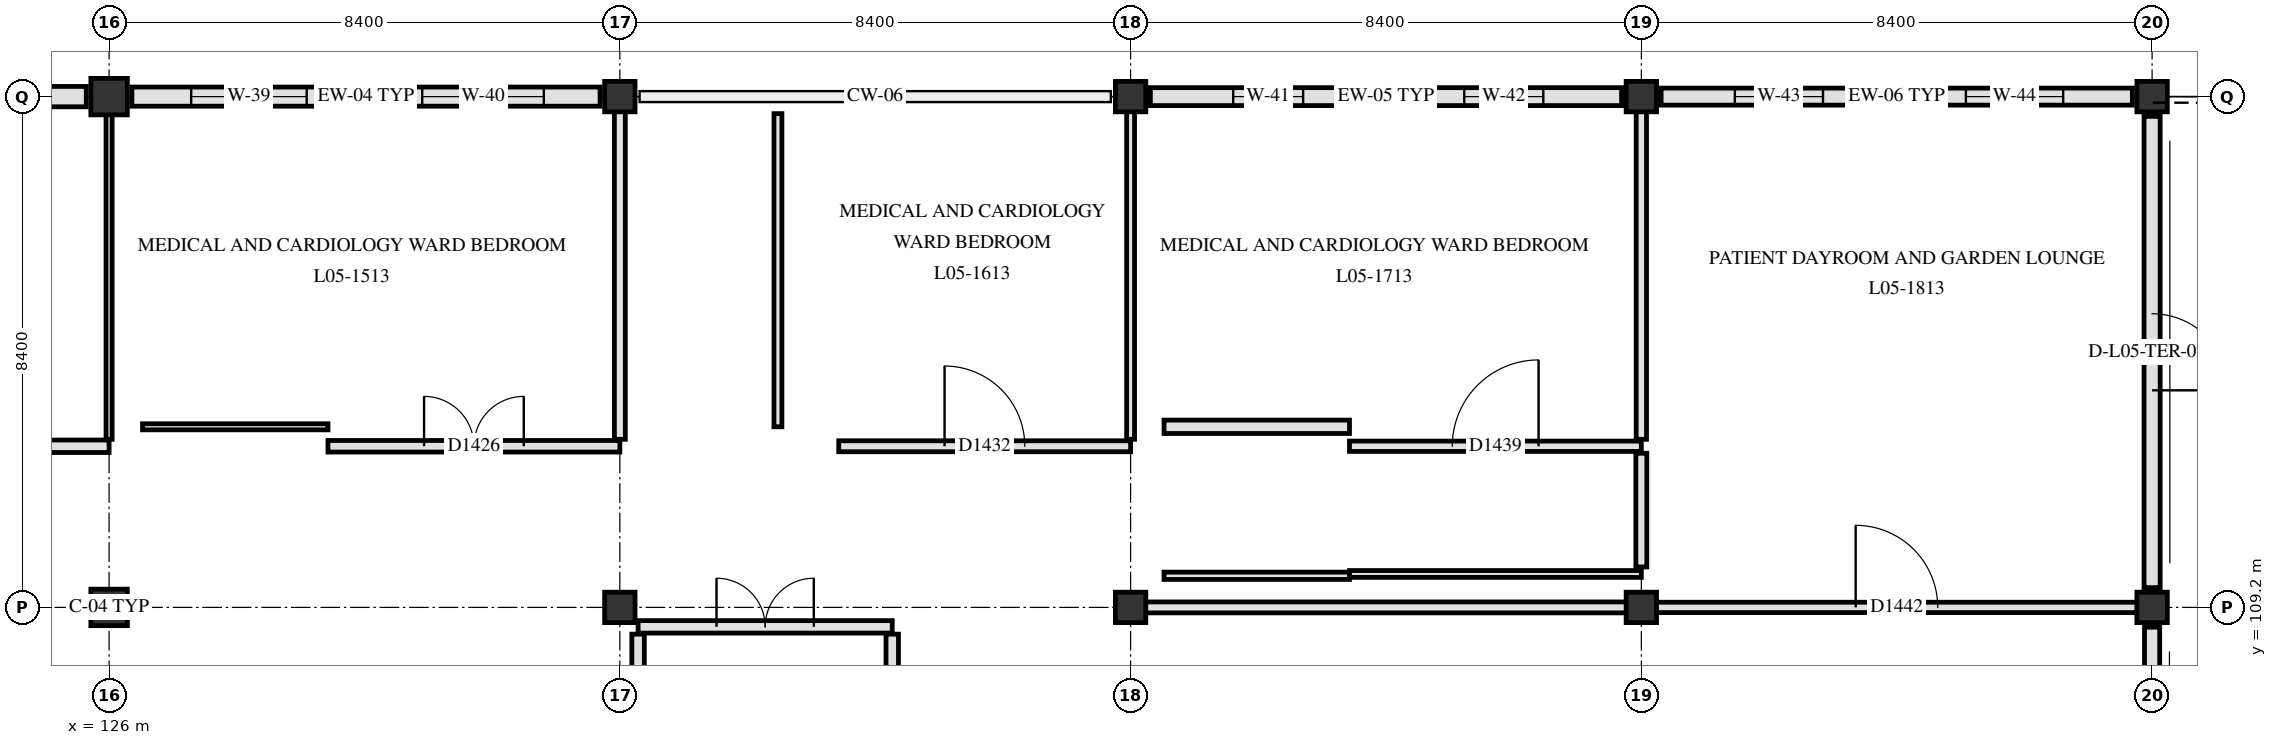
"""IFC4 building model, lengths in metres.
Left out: names, types, materials, properties, quantities, classifications, styles, units other than length and angle.
Written with IfcOpenShell. Run it as: python <this file> out.ifc"""

import sys

from ifc_helpers import new_model, si_unit, direction, frame, frame_2d, origin, origin_2d, place, context, subcontext, project, spatial, rectangle, extrude, element, fill, save


model = new_model("IFC4")
c1 = context("Model", 3, precision=1e-05, world=origin(), true_north=direction((0.0, 1.0)))
c2 = subcontext(c1, "Body", "Model", "MODEL_VIEW")
j1 = project(units=[si_unit("LENGTHUNIT", "METRE"), si_unit("PLANEANGLEUNIT", "RADIAN")], contexts=[c1])
p1 = place(None, origin())
s1 = spatial("IfcSite", under=j1, at=p1, CompositionType="ELEMENT")
p2 = place(p1, origin())
s2 = spatial("IfcBuilding", under=s1, at=p2, CompositionType="ELEMENT")
p3 = place(p2, frame((0.0, 0.0, 22.5)))
s3 = spatial("IfcBuildingStorey", under=s2, at=p3, CompositionType="ELEMENT", Elevation=22.5)
for number, where, z_axis, x_axis in (
    (1, (126.0, 109.2, 0.0), (0.0, 0.0, 1.0), (1.0, 0.0, 0.0)),
    (2, (126.0, 117.6, 0.0), (0.0, 0.0, 1.0), (1.0, 0.0, 0.0)),
):
    element("IfcColumn", number, at=place(p3, frame(where, z_axis=z_axis, x_axis=x_axis)), inside=s3, PredefinedType="COLUMN", context=c2, shape_type="SweptSolid", body=[
        extrude(rectangle(XDim=0.6, YDim=0.6, at=origin_2d()), origin(), (0.0, 0.0, 1.0), 3.9),
    ])
for number, where, z_axis, x_axis in (
    (3, (134.4, 109.2, 0.0), (0.0, 0.0, 1.0), (1.0, 0.0, 0.0)),
    (4, (134.4, 117.6, 0.0), (0.0, 0.0, 1.0), (1.0, 0.0, 0.0)),
    (5, (142.8, 109.2, 0.0), (0.0, 0.0, 1.0), (1.0, 0.0, 0.0)),
    (6, (142.8, 117.6, 0.0), (0.0, 0.0, 1.0), (1.0, 0.0, 0.0)),
    (7, (151.2, 109.2, 0.0), (0.0, 0.0, 1.0), (1.0, 0.0, 0.0)),
    (8, (151.2, 117.6, 0.0), (0.0, 0.0, 1.0), (1.0, 0.0, 0.0)),
    (9, (159.6, 109.2, 0.0), (0.0, 0.0, 1.0), (1.0, 0.0, 0.0)),
    (10, (159.6, 117.6, 0.0), (0.0, 0.0, 1.0), (1.0, 0.0, 0.0)),
):
    element("IfcColumn", number, at=place(p3, frame(where, z_axis=z_axis, x_axis=x_axis)), inside=s3, PredefinedType="COLUMN", context=c2, shape_type="SweptSolid", body=[
        extrude(rectangle(XDim=0.5, YDim=0.5, at=origin_2d()), origin(), (0.0, 0.0, 1.0), 3.9),
    ])
p4 = place(p3, frame((117.975, 117.6, 0.0), z_axis=(0.0, 0.0, 1.0), x_axis=(1.0, 0.0, 0.0)))
e11 = element("IfcWall", 11, at=p4, inside=s3, PredefinedType="SOLIDWALL", context=c2, shape_type="SweptSolid", body=[
    extrude(rectangle(XDim=7.65, YDim=0.335, at=frame_2d((3.825, 0.0))), origin(), (0.0, 0.0, 1.0), 3.31),
])
p5 = place(p4, frame((1.062, 0.0, 0.85)))
e12 = element("IfcOpeningElement", 12, at=p5, cuts=e11, PredefinedType="OPENING", context=c2, shape_type="SweptSolid", body=[
    extrude(rectangle(XDim=1.7, YDim=1.66, at=frame_2d((0.85, 0.83))), frame((0.0, 0.177, 0.0), z_axis=(0.0, -1.0, 0.0), x_axis=(1.0, 0.0, 0.0)), (0.0, 0.0, 1.0), 0.355),
])
p6 = place(p4, frame((4.837, 0.0, 0.85)))
e13 = element("IfcOpeningElement", 13, at=p6, cuts=e11, PredefinedType="OPENING", context=c2, shape_type="SweptSolid", body=[
    extrude(rectangle(XDim=1.8, YDim=1.66, at=frame_2d((0.9, 0.83))), frame((0.0, 0.177, 0.0), z_axis=(0.0, -1.0, 0.0), x_axis=(1.0, 0.0, 0.0)), (0.0, 0.0, 1.0), 0.355),
])
p7 = place(p3, frame((126.375, 117.6, 0.0), z_axis=(0.0, 0.0, 1.0), x_axis=(1.0, 0.0, 0.0)))
e14 = element("IfcWall", 14, at=p7, inside=s3, PredefinedType="SOLIDWALL", context=c2, shape_type="SweptSolid", body=[
    extrude(rectangle(XDim=7.7, YDim=0.315, at=frame_2d((3.85, 0.0))), origin(), (0.0, 0.0, 1.0), 3.31),
])
p8 = place(p7, frame((0.975, 0.0, 0.85)))
e15 = element("IfcOpeningElement", 15, at=p8, cuts=e14, PredefinedType="OPENING", context=c2, shape_type="SweptSolid", body=[
    extrude(rectangle(XDim=1.9, YDim=1.66, at=frame_2d((0.95, 0.83))), frame((0.0, 0.167, 0.0), z_axis=(0.0, -1.0, 0.0), x_axis=(1.0, 0.0, 0.0)), (0.0, 0.0, 1.0), 0.335),
])
p9 = place(p7, frame((4.775, 0.0, 0.85)))
e16 = element("IfcOpeningElement", 16, at=p9, cuts=e14, PredefinedType="OPENING", context=c2, shape_type="SweptSolid", body=[
    extrude(rectangle(XDim=2.0, YDim=1.66, at=frame_2d((1.0, 0.83))), frame((0.0, 0.167, 0.0), z_axis=(0.0, -1.0, 0.0), x_axis=(1.0, 0.0, 0.0)), (0.0, 0.0, 1.0), 0.335),
])
p10 = place(p3, frame((143.125, 117.6, 0.0), z_axis=(0.0, 0.0, 1.0), x_axis=(1.0, 0.0, 0.0)))
e17 = element("IfcWall", 17, at=p10, inside=s3, PredefinedType="SOLIDWALL", context=c2, shape_type="SweptSolid", body=[
    extrude(rectangle(XDim=7.75, YDim=0.295, at=frame_2d((3.875, 0.0))), origin(), (0.0, 0.0, 1.0), 3.31),
])
p11 = place(p10, frame((1.363, 0.0, 0.85)))
e18 = element("IfcOpeningElement", 18, at=p11, cuts=e17, PredefinedType="OPENING", context=c2, shape_type="SweptSolid", body=[
    extrude(rectangle(XDim=1.15, YDim=1.78, at=frame_2d((0.575, 0.89))), frame((0.0, 0.157, 0.0), z_axis=(0.0, -1.0, 0.0), x_axis=(1.0, 0.0, 0.0)), (0.0, 0.0, 1.0), 0.315),
])
p12 = place(p10, frame((5.163, 0.0, 0.85)))
e19 = element("IfcOpeningElement", 19, at=p12, cuts=e17, PredefinedType="OPENING", context=c2, shape_type="SweptSolid", body=[
    extrude(rectangle(XDim=1.3, YDim=1.78, at=frame_2d((0.65, 0.89))), frame((0.0, 0.157, 0.0), z_axis=(0.0, -1.0, 0.0), x_axis=(1.0, 0.0, 0.0)), (0.0, 0.0, 1.0), 0.315),
])
p13 = place(p3, frame((151.525, 117.6, 0.0), z_axis=(0.0, 0.0, 1.0), x_axis=(1.0, 0.0, 0.0)))
e20 = element("IfcWall", 20, at=p13, inside=s3, PredefinedType="SOLIDWALL", context=c2, shape_type="SweptSolid", body=[
    extrude(rectangle(XDim=7.75, YDim=0.28, at=frame_2d((3.875, 0.0))), origin(), (0.0, 0.0, 1.0), 3.3),
])
p14 = place(p13, frame((1.212, 0.0, 0.85)))
e21 = element("IfcOpeningElement", 21, at=p14, cuts=e20, PredefinedType="OPENING", context=c2, shape_type="SweptSolid", body=[
    extrude(rectangle(XDim=1.45, YDim=1.78, at=frame_2d((0.725, 0.89))), frame((0.0, 0.15, 0.0), z_axis=(0.0, -1.0, 0.0), x_axis=(1.0, 0.0, 0.0)), (0.0, 0.0, 1.0), 0.3),
])
p15 = place(p13, frame((5.012, 0.0, 0.85)))
e22 = element("IfcOpeningElement", 22, at=p15, cuts=e20, PredefinedType="OPENING", context=c2, shape_type="SweptSolid", body=[
    extrude(rectangle(XDim=1.6, YDim=1.78, at=frame_2d((0.8, 0.89))), frame((0.0, 0.15, 0.0), z_axis=(0.0, -1.0, 0.0), x_axis=(1.0, 0.0, 0.0)), (0.0, 0.0, 1.0), 0.3),
])
p16 = place(p3, frame((159.6, 117.275, 0.0), z_axis=(0.0, 0.0, 1.0), x_axis=(0.0, -1.0, 0.0)))
e23 = element("IfcWall", 23, at=p16, inside=s3, PredefinedType="SOLIDWALL", context=c2, shape_type="SweptSolid", body=[
    extrude(rectangle(XDim=7.75, YDim=0.265, at=frame_2d((3.875, 0.0))), origin(), (0.0, 0.0, 1.0), 3.37),
])
p17 = place(p16, frame((3.245, 0.0, 0.0)))
e24 = element("IfcOpeningElement", 24, at=p17, cuts=e23, PredefinedType="OPENING", context=c2, shape_type="SweptSolid", body=[
    extrude(rectangle(XDim=1.26, YDim=2.15, at=frame_2d((0.63, 1.075))), frame((0.0, 0.142, 0.0), z_axis=(0.0, -1.0, 0.0), x_axis=(1.0, 0.0, 0.0)), (0.0, 0.0, 1.0), 0.285),
])
p18 = place(p3, frame((159.6, 108.875, 0.0), z_axis=(0.0, 0.0, 1.0), x_axis=(0.0, -1.0, 0.0)))
e25 = element("IfcWall", 25, at=p18, inside=s3, PredefinedType="SOLIDWALL", context=c2, shape_type="SweptSolid", body=[
    extrude(rectangle(XDim=7.75, YDim=0.25, at=frame_2d((3.875, 0.0))), origin(), (0.0, 0.0, 1.0), 3.37),
])
p19 = place(p18, frame((1.462, 0.0, 0.85)))
e26 = element("IfcOpeningElement", 26, at=p19, cuts=e25, PredefinedType="OPENING", context=c2, shape_type="SweptSolid", body=[
    extrude(rectangle(XDim=0.95, YDim=1.3, at=frame_2d((0.475, 0.65))), frame((0.0, 0.135, 0.0), z_axis=(0.0, -1.0, 0.0), x_axis=(1.0, 0.0, 0.0)), (0.0, 0.0, 1.0), 0.27),
])
p20 = place(p18, frame((5.288, 0.0, 0.85)))
e27 = element("IfcOpeningElement", 27, at=p20, cuts=e25, PredefinedType="OPENING", context=c2, shape_type="SweptSolid", body=[
    extrude(rectangle(XDim=1.05, YDim=1.3, at=frame_2d((0.525, 0.65))), frame((0.0, 0.135, 0.0), z_axis=(0.0, -1.0, 0.0), x_axis=(1.0, 0.0, 0.0)), (0.0, 0.0, 1.0), 0.27),
])
for number, where, z_axis, x_axis in (
    (28, (138.88, 104.64, 0.0), (0.0, 0.0, 1.0), (0.0, 1.0, 0.0)),
    (29, (134.7, 104.64, 0.0), (0.0, 0.0, 1.0), (0.0, 1.0, 0.0)),
):
    element("IfcWall", number, at=place(p3, frame(where, z_axis=z_axis, x_axis=x_axis)), inside=s3, PredefinedType="PARTITIONING", context=c2, shape_type="SweptSolid", body=[
        extrude(rectangle(XDim=4.12, YDim=0.205, at=frame_2d((2.06, 0.0))), origin(), (0.0, 0.0, 1.0), 3.61),
    ])
p21 = place(p3, frame((134.7, 108.88, 0.0), z_axis=(0.0, 0.0, 1.0), x_axis=(1.0, 0.0, 0.0)))
e30 = element("IfcWall", 30, at=p21, inside=s3, PredefinedType="PARTITIONING", context=c2, shape_type="SweptSolid", body=[
    extrude(rectangle(XDim=4.18, YDim=0.205, at=frame_2d((2.09, 0.0))), origin(), (0.0, 0.0, 1.0), 3.61),
])
p22 = place(p21, frame((1.29, 0.0, 0.0)))
e31 = element("IfcOpeningElement", 31, at=p22, cuts=e30, PredefinedType="OPENING", context=c2, shape_type="SweptSolid", body=[
    extrude(rectangle(XDim=1.6, YDim=2.25, at=frame_2d((0.8, 1.125))), frame((0.0, 0.113, 0.0), z_axis=(0.0, -1.0, 0.0), x_axis=(1.0, 0.0, 0.0)), (0.0, 0.0, 1.0), 0.225),
])
p23 = place(p3, frame((143.045, 109.2, 0.0), z_axis=(0.0, 0.0, 1.0), x_axis=(1.0, 0.0, 0.0)))
e32 = element("IfcWall", 32, at=p23, inside=s3, PredefinedType="PARTITIONING", context=c2, shape_type="SweptSolid", body=[
    extrude(rectangle(XDim=7.91, YDim=0.18, at=frame_2d((3.955, 0.0))), origin(), (0.0, 0.0, 1.0), 3.16),
])
p24 = place(p3, frame((151.445, 109.2, 0.0), z_axis=(0.0, 0.0, 1.0), x_axis=(1.0, 0.0, 0.0)))
e33 = element("IfcWall", 33, at=p24, inside=s3, PredefinedType="PARTITIONING", context=c2, shape_type="SweptSolid", body=[
    extrude(rectangle(XDim=7.91, YDim=0.17, at=frame_2d((3.955, 0.0))), origin(), (0.0, 0.0, 1.0), 3.15),
])
p25 = place(p24, frame((3.28, 0.0, 0.0)))
e34 = element("IfcOpeningElement", 34, at=p25, cuts=e33, PredefinedType="OPENING", context=c2, shape_type="SweptSolid", body=[
    extrude(rectangle(XDim=1.35, YDim=2.2, at=frame_2d((0.675, 1.1))), frame((0.0, 0.095, 0.0), z_axis=(0.0, -1.0, 0.0), x_axis=(1.0, 0.0, 0.0)), (0.0, 0.0, 1.0), 0.19),
])
p26 = place(p3, frame((143.35, 109.72, 0.0), z_axis=(0.0, 0.0, 1.0), x_axis=(1.0, 0.0, 0.0)))
e35 = element("IfcWall", 35, at=p26, inside=s3, PredefinedType="PARTITIONING", context=c2, shape_type="SweptSolid", body=[
    extrude(rectangle(XDim=3.05, YDim=0.12, at=frame_2d((1.525, 0.0))), origin(), (0.0, 0.0, 1.0), 3.61),
])
p27 = place(p3, frame((146.4, 109.75, 0.0), z_axis=(0.0, 0.0, 1.0), x_axis=(1.0, 0.0, 0.0)))
e36 = element("IfcWall", 36, at=p27, inside=s3, PredefinedType="PARTITIONING", context=c2, shape_type="SweptSolid", body=[
    extrude(rectangle(XDim=4.8, YDim=0.112, at=frame_2d((2.4, 0.0))), origin(), (0.0, 0.0, 1.0), 3.29),
])
p28 = place(p3, frame((121.2, 111.85, 0.0), z_axis=(0.0, 0.0, 1.0), x_axis=(1.0, 0.0, 0.0)))
e37 = element("IfcWall", 37, at=p28, inside=s3, PredefinedType="PARTITIONING", context=c2, shape_type="SweptSolid", body=[
    extrude(rectangle(XDim=4.8, YDim=0.205, at=frame_2d((2.4, 0.0))), origin(), (0.0, 0.0, 1.0), 3.3),
])
p29 = place(p28, frame((1.925, 0.0, 0.0)))
e38 = element("IfcOpeningElement", 38, at=p29, cuts=e37, PredefinedType="OPENING", context=c2, shape_type="SweptSolid", body=[
    extrude(rectangle(XDim=0.95, YDim=2.1, at=frame_2d((0.475, 1.05))), frame((0.0, 0.113, 0.0), z_axis=(0.0, -1.0, 0.0), x_axis=(1.0, 0.0, 0.0)), (0.0, 0.0, 1.0), 0.225),
])
p30 = place(p3, frame((129.6, 111.85, 0.0), z_axis=(0.0, 0.0, 1.0), x_axis=(1.0, 0.0, 0.0)))
e39 = element("IfcWall", 39, at=p30, inside=s3, PredefinedType="PARTITIONING", context=c2, shape_type="SweptSolid", body=[
    extrude(rectangle(XDim=4.8, YDim=0.19, at=frame_2d((2.4, 0.0))), origin(), (0.0, 0.0, 1.0), 3.3),
])
p31 = place(p30, frame((1.58, 0.0, 0.0)))
e40 = element("IfcOpeningElement", 40, at=p31, cuts=e39, PredefinedType="OPENING", context=c2, shape_type="SweptSolid", body=[
    extrude(rectangle(XDim=1.64, YDim=2.28, at=frame_2d((0.82, 1.14))), frame((0.0, 0.105, 0.0), z_axis=(0.0, -1.0, 0.0), x_axis=(1.0, 0.0, 0.0)), (0.0, 0.0, 1.0), 0.21),
])
p32 = place(p3, frame((138.0, 111.85, 0.0), z_axis=(0.0, 0.0, 1.0), x_axis=(1.0, 0.0, 0.0)))
e41 = element("IfcWall", 41, at=p32, inside=s3, PredefinedType="PARTITIONING", context=c2, shape_type="SweptSolid", body=[
    extrude(rectangle(XDim=4.8, YDim=0.18, at=frame_2d((2.4, 0.0))), origin(), (0.0, 0.0, 1.0), 3.3),
])
p33 = place(p32, frame((1.74, 0.0, 0.0)))
e42 = element("IfcOpeningElement", 42, at=p33, cuts=e41, PredefinedType="OPENING", context=c2, shape_type="SweptSolid", body=[
    extrude(rectangle(XDim=1.32, YDim=2.18, at=frame_2d((0.66, 1.09))), frame((0.0, 0.1, 0.0), z_axis=(0.0, -1.0, 0.0), x_axis=(1.0, 0.0, 0.0)), (0.0, 0.0, 1.0), 0.2),
])
p34 = place(p3, frame((146.4, 111.85, 0.0), z_axis=(0.0, 0.0, 1.0), x_axis=(1.0, 0.0, 0.0)))
e43 = element("IfcWall", 43, at=p34, inside=s3, PredefinedType="PARTITIONING", context=c2, shape_type="SweptSolid", body=[
    extrude(rectangle(XDim=4.8, YDim=0.17, at=frame_2d((2.4, 0.0))), origin(), (0.0, 0.0, 1.0), 3.29),
])
p35 = place(p34, frame((1.69, 0.0, 0.0)))
e44 = element("IfcOpeningElement", 44, at=p35, cuts=e43, PredefinedType="OPENING", context=c2, shape_type="SweptSolid", body=[
    extrude(rectangle(XDim=1.42, YDim=2.22, at=frame_2d((0.71, 1.11))), frame((0.0, 0.095, 0.0), z_axis=(0.0, -1.0, 0.0), x_axis=(1.0, 0.0, 0.0)), (0.0, 0.0, 1.0), 0.19),
])
p36 = place(p3, frame((126.55, 112.17, 0.0), z_axis=(0.0, 0.0, 1.0), x_axis=(1.0, 0.0, 0.0)))
e45 = element("IfcWall", 45, at=p36, inside=s3, PredefinedType="PARTITIONING", context=c2, shape_type="SweptSolid", body=[
    extrude(rectangle(XDim=3.05, YDim=0.1, at=frame_2d((1.525, 0.0))), origin(), (0.0, 0.0, 1.0), 3.61),
])
p37 = place(p3, frame((143.35, 112.17, 0.0), z_axis=(0.0, 0.0, 1.0), x_axis=(1.0, 0.0, 0.0)))
e46 = element("IfcWall", 46, at=p37, inside=s3, PredefinedType="PARTITIONING", context=c2, shape_type="SweptSolid", body=[
    extrude(rectangle(XDim=3.05, YDim=0.22, at=frame_2d((1.525, 0.0))), origin(), (0.0, 0.0, 1.0), 3.34),
])
p38 = place(p3, frame((126.0, 111.965, 0.0), z_axis=(0.0, 0.0, 1.0), x_axis=(0.0, 1.0, 0.0)))
e47 = element("IfcWall", 47, at=p38, inside=s3, PredefinedType="PARTITIONING", context=c2, shape_type="SweptSolid", body=[
    extrude(rectangle(XDim=5.34, YDim=0.1, at=frame_2d((2.67, 0.0))), origin(), (0.0, 0.0, 1.0), 3.3),
])
p39 = place(p3, frame((134.4, 111.965, 0.0), z_axis=(0.0, 0.0, 1.0), x_axis=(0.0, 1.0, 0.0)))
e48 = element("IfcWall", 48, at=p39, inside=s3, PredefinedType="PARTITIONING", context=c2, shape_type="SweptSolid", body=[
    extrude(rectangle(XDim=5.39, YDim=0.18, at=frame_2d((2.695, 0.0))), origin(), (0.0, 0.0, 1.0), 3.3),
])
p40 = place(p3, frame((137.0, 112.17, 0.0), z_axis=(0.0, 0.0, 1.0), x_axis=(0.0, 1.0, 0.0)))
e49 = element("IfcWall", 49, at=p40, inside=s3, PredefinedType="PARTITIONING", context=c2, shape_type="SweptSolid", body=[
    extrude(rectangle(XDim=5.15, YDim=0.13, at=frame_2d((2.575, 0.0))), origin(), (0.0, 0.0, 1.0), 3.34),
])
p41 = place(p3, frame((142.8, 111.965, 0.0), z_axis=(0.0, 0.0, 1.0), x_axis=(0.0, 1.0, 0.0)))
e50 = element("IfcWall", 50, at=p41, inside=s3, PredefinedType="PARTITIONING", context=c2, shape_type="SweptSolid", body=[
    extrude(rectangle(XDim=5.39, YDim=0.13, at=frame_2d((2.695, 0.0))), origin(), (0.0, 0.0, 1.0), 3.3),
])
p42 = place(p3, frame((151.2, 109.865, 0.0), z_axis=(0.0, 0.0, 1.0), x_axis=(0.0, 1.0, 0.0)))
e51 = element("IfcWall", 51, at=p42, inside=s3, PredefinedType="PARTITIONING", context=c2, shape_type="SweptSolid", body=[
    extrude(rectangle(XDim=1.87, YDim=0.18, at=frame_2d((0.935, 0.0))), origin(), (0.0, 0.0, 1.0), 3.29),
])
p43 = place(p3, frame((151.2, 111.965, 0.0), z_axis=(0.0, 0.0, 1.0), x_axis=(0.0, 1.0, 0.0)))
e52 = element("IfcWall", 52, at=p43, inside=s3, PredefinedType="PARTITIONING", context=c2, shape_type="SweptSolid", body=[
    extrude(rectangle(XDim=5.39, YDim=0.17, at=frame_2d((2.695, 0.0))), origin(), (0.0, 0.0, 1.0), 3.29),
])
p44 = place(p8, origin())
e53 = element("IfcWindow", 53, at=p44, inside=s3, PartitioningType="SINGLE_PANEL", PredefinedType="WINDOW", context=c2, shape_type="SweptSolid", body=[
    extrude(rectangle(XDim=1.9, YDim=1.66, at=frame_2d((0.95, 0.83))), frame((0.0, 0.03, 0.0), z_axis=(0.0, -1.0, 0.0), x_axis=(1.0, 0.0, 0.0)), (0.0, 0.0, 1.0), 0.06),
])
fill(e15, e53)
p45 = place(p9, origin())
e54 = element("IfcWindow", 54, at=p45, inside=s3, PartitioningType="SINGLE_PANEL", PredefinedType="WINDOW", context=c2, shape_type="SweptSolid", body=[
    extrude(rectangle(XDim=2.0, YDim=1.66, at=frame_2d((1.0, 0.83))), frame((0.0, 0.03, 0.0), z_axis=(0.0, -1.0, 0.0), x_axis=(1.0, 0.0, 0.0)), (0.0, 0.0, 1.0), 0.06),
])
fill(e16, e54)
p46 = place(p11, origin())
e55 = element("IfcWindow", 55, at=p46, inside=s3, PartitioningType="SINGLE_PANEL", PredefinedType="WINDOW", context=c2, shape_type="SweptSolid", body=[
    extrude(rectangle(XDim=1.15, YDim=1.78, at=frame_2d((0.575, 0.89))), frame((0.0, 0.03, 0.0), z_axis=(0.0, -1.0, 0.0), x_axis=(1.0, 0.0, 0.0)), (0.0, 0.0, 1.0), 0.06),
])
fill(e18, e55)
p47 = place(p12, origin())
e56 = element("IfcWindow", 56, at=p47, inside=s3, PartitioningType="SINGLE_PANEL", PredefinedType="WINDOW", context=c2, shape_type="SweptSolid", body=[
    extrude(rectangle(XDim=1.3, YDim=1.78, at=frame_2d((0.65, 0.89))), frame((0.0, 0.03, 0.0), z_axis=(0.0, -1.0, 0.0), x_axis=(1.0, 0.0, 0.0)), (0.0, 0.0, 1.0), 0.06),
])
fill(e19, e56)
p48 = place(p14, origin())
e57 = element("IfcWindow", 57, at=p48, inside=s3, PartitioningType="SINGLE_PANEL", PredefinedType="WINDOW", context=c2, shape_type="SweptSolid", body=[
    extrude(rectangle(XDim=1.45, YDim=1.78, at=frame_2d((0.725, 0.89))), frame((0.0, 0.03, 0.0), z_axis=(0.0, -1.0, 0.0), x_axis=(1.0, 0.0, 0.0)), (0.0, 0.0, 1.0), 0.06),
])
fill(e21, e57)
p49 = place(p15, origin())
e58 = element("IfcWindow", 58, at=p49, inside=s3, PartitioningType="SINGLE_PANEL", PredefinedType="WINDOW", context=c2, shape_type="SweptSolid", body=[
    extrude(rectangle(XDim=1.6, YDim=1.78, at=frame_2d((0.8, 0.89))), frame((0.0, 0.03, 0.0), z_axis=(0.0, -1.0, 0.0), x_axis=(1.0, 0.0, 0.0)), (0.0, 0.0, 1.0), 0.06),
])
fill(e22, e58)
p50 = place(p17, origin())
e59 = element("IfcDoor", 59, at=p50, inside=s3, OperationType="SINGLE_SWING_RIGHT", PredefinedType="DOOR", context=c2, shape_type="SweptSolid", body=[
    extrude(rectangle(XDim=1.26, YDim=2.15, at=frame_2d((0.63, 1.075))), frame((0.0, 0.025, 0.0), z_axis=(0.0, -1.0, 0.0), x_axis=(1.0, 0.0, 0.0)), (0.0, 0.0, 1.0), 0.05),
])
fill(e24, e59)
p51 = place(p22, origin())
e60 = element("IfcDoor", 60, at=p51, inside=s3, OperationType="DOUBLE_SWING_LEFT", PredefinedType="DOOR", context=c2, shape_type="SweptSolid", body=[
    extrude(rectangle(XDim=1.6, YDim=2.25, at=frame_2d((0.8, 1.125))), frame((0.0, 0.025, 0.0), z_axis=(0.0, -1.0, 0.0), x_axis=(1.0, 0.0, 0.0)), (0.0, 0.0, 1.0), 0.05),
])
fill(e31, e60)
p52 = place(p31, origin())
e61 = element("IfcDoor", 61, at=p52, inside=s3, OperationType="DOUBLE_SWING_LEFT", PredefinedType="DOOR", context=c2, shape_type="SweptSolid", body=[
    extrude(rectangle(XDim=1.64, YDim=2.28, at=frame_2d((0.82, 1.14))), frame((0.0, 0.025, 0.0), z_axis=(0.0, -1.0, 0.0), x_axis=(1.0, 0.0, 0.0)), (0.0, 0.0, 1.0), 0.05),
])
fill(e40, e61)
p53 = place(p33, origin())
e62 = element("IfcDoor", 62, at=p53, inside=s3, OperationType="SINGLE_SWING_LEFT", PredefinedType="DOOR", context=c2, shape_type="SweptSolid", body=[
    extrude(rectangle(XDim=1.32, YDim=2.18, at=frame_2d((0.66, 1.09))), frame((0.0, 0.025, 0.0), z_axis=(0.0, -1.0, 0.0), x_axis=(1.0, 0.0, 0.0)), (0.0, 0.0, 1.0), 0.05),
])
fill(e42, e62)
p54 = place(p35, origin())
e63 = element("IfcDoor", 63, at=p54, inside=s3, OperationType="SINGLE_SWING_RIGHT", PredefinedType="DOOR", context=c2, shape_type="SweptSolid", body=[
    extrude(rectangle(XDim=1.42, YDim=2.22, at=frame_2d((0.71, 1.11))), frame((0.0, 0.025, 0.0), z_axis=(0.0, -1.0, 0.0), x_axis=(1.0, 0.0, 0.0)), (0.0, 0.0, 1.0), 0.05),
])
fill(e44, e63)
p55 = place(p25, origin())
e64 = element("IfcDoor", 64, at=p55, inside=s3, OperationType="SINGLE_SWING_LEFT", PredefinedType="DOOR", context=c2, shape_type="SweptSolid", body=[
    extrude(rectangle(XDim=1.35, YDim=2.2, at=frame_2d((0.675, 1.1))), frame((0.0, 0.025, 0.0), z_axis=(0.0, -1.0, 0.0), x_axis=(1.0, 0.0, 0.0)), (0.0, 0.0, 1.0), 0.05),
])
fill(e34, e64)
save(model, sys.argv[1])
